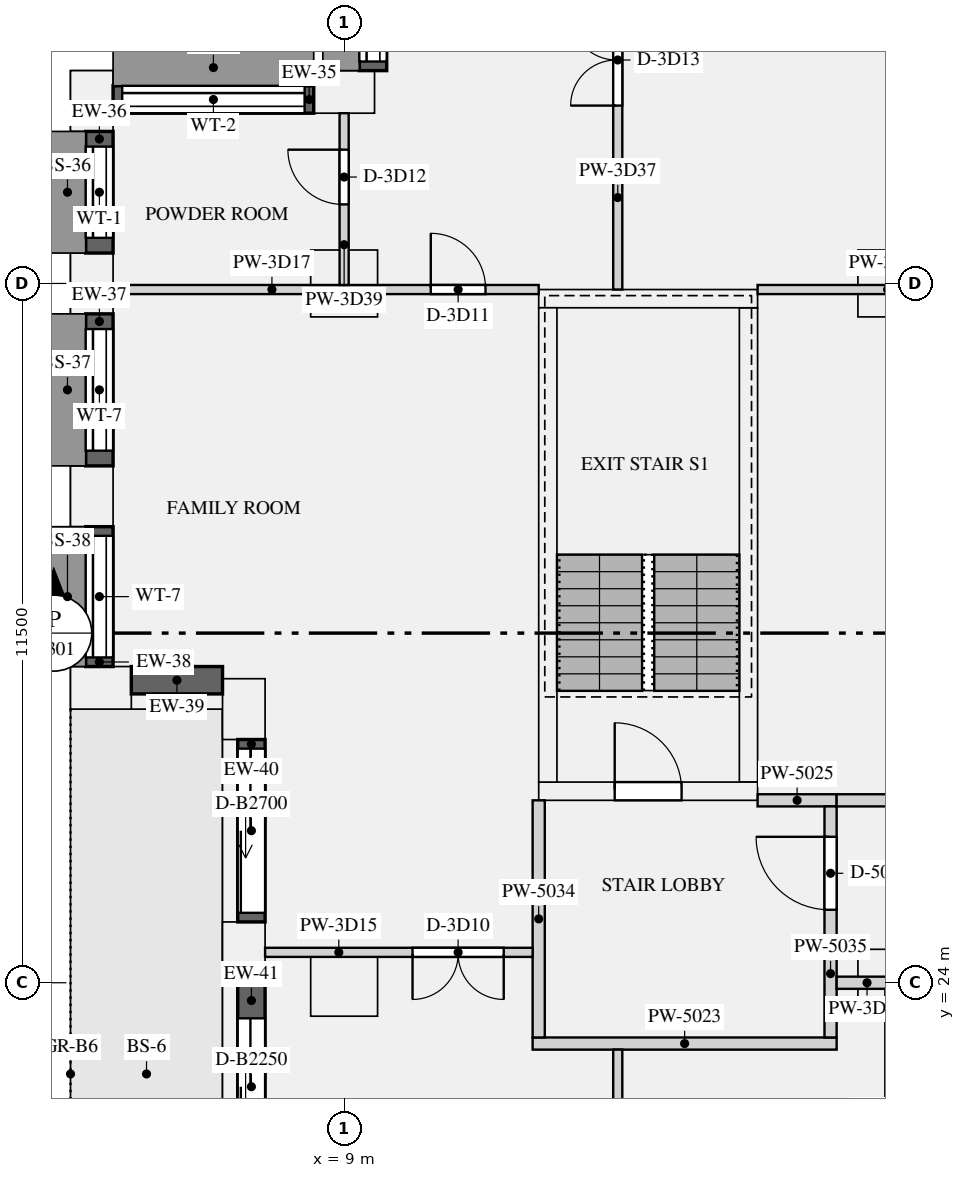
"""IFC4 building model, lengths in metres.
Left out: names, types, materials, properties, quantities, classifications, styles, units other than length and angle.
Written with IfcOpenShell. Run it as: python <this file> out.ifc"""

import sys

from ifc_helpers import new_model, si_unit, direction, frame, frame_2d, origin, origin_2d, place, context, subcontext, project, spatial, rectangle, extrude, element, fill, save


model = new_model("IFC4")
c1 = context("Model", 3, precision=1e-05, world=origin(), true_north=direction((0.0, 1.0)))
c2 = subcontext(c1, "Body", "Model", "MODEL_VIEW")
j1 = project(units=[si_unit("LENGTHUNIT", "METRE"), si_unit("PLANEANGLEUNIT", "RADIAN")], contexts=[c1])
p1 = place(None, origin())
s1 = spatial("IfcSite", under=j1, at=p1, CompositionType="ELEMENT")
p2 = place(p1, origin())
s2 = spatial("IfcBuilding", under=s1, at=p2, CompositionType="ELEMENT")
p3 = place(p2, frame((0.0, 0.0, 166.5)))
s3 = spatial("IfcBuildingStorey", under=s2, at=p3, CompositionType="ELEMENT", Elevation=166.5)
for number, where, z_axis, x_axis in (
    (1, (9.0, 38.65, 0.0), (0.0, 0.0, 1.0), (-1.0, 0.0, 0.0)),
    (2, (4.85, 38.5, 0.0), (0.0, 0.0, 1.0), (0.0, -1.0, 0.0)),
    (3, (4.85, 35.5, 0.0), (0.0, 0.0, 1.0), (0.0, -1.0, 0.0)),
    (4, (4.85, 32.0, 0.0), (0.0, 0.0, 1.0), (0.0, -1.0, 0.0)),
    (5, (5.0, 28.85, 0.0), (0.0, 0.0, 1.0), (1.0, 0.0, 0.0)),
    (6, (7.35, 28.5, 0.0), (0.0, 0.0, 1.0), (0.0, -1.0, 0.0)),
    (7, (7.35, 24.5, 0.0), (0.0, 0.0, 1.0), (0.0, -1.0, 0.0)),
):
    element("IfcColumn", number, at=place(p3, frame(where, z_axis=z_axis, x_axis=x_axis)), inside=s3, PredefinedType="USERDEFINED", context=c2, shape_type="SweptSolid", body=[
        extrude(rectangle(XDim=1.0, YDim=0.7, at=origin_2d()), origin(), (0.0, 0.0, 1.0), 3.15),
    ])
for number, where, z_axis, x_axis in (
    (8, (9.0, 24.0, 0.0), (0.0, 0.0, 1.0), (1.0, 0.0, 0.0)),
    (9, (18.0, 24.0, 0.0), (0.0, 0.0, 1.0), (1.0, 0.0, 0.0)),
    (10, (9.0, 35.5, 0.0), (0.0, 0.0, 1.0), (1.0, 0.0, 0.0)),
    (11, (18.0, 35.5, 0.0), (0.0, 0.0, 1.0), (1.0, 0.0, 0.0)),
):
    element("IfcColumn", number, at=place(p3, frame(where, z_axis=z_axis, x_axis=x_axis)), inside=s3, PredefinedType="COLUMN", context=c2, shape_type="SweptSolid", body=[
        extrude(rectangle(XDim=1.1, YDim=1.1, at=origin_2d()), origin(), (0.0, 0.0, 1.0), 3.15),
    ])
p4 = place(p3, frame((12.2, 27.15, 0.0), z_axis=(0.0, 0.0, 1.0), x_axis=(1.0, 0.0, 0.0)))
e12 = element("IfcWall", 12, at=p4, inside=s3, PredefinedType="SHEAR", context=c2, shape_type="SweptSolid", body=[
    extrude(rectangle(XDim=3.6, YDim=0.3, at=frame_2d((1.8, 0.0))), origin(), (0.0, 0.0, 1.0), 3.15),
])
p5 = place(p4, frame((1.25, 0.0, 0.0)))
e13 = element("IfcOpeningElement", 13, at=p5, cuts=e12, PredefinedType="OPENING", context=c2, shape_type="SweptSolid", body=[
    extrude(rectangle(XDim=1.1, YDim=2.1, at=frame_2d((0.55, 1.05))), frame((0.0, 0.16, 0.0), z_axis=(0.0, -1.0, 0.0), x_axis=(1.0, 0.0, 0.0)), (0.0, 0.0, 1.0), 0.32),
])
p6 = place(p3, frame((12.2, 35.25, 0.0), z_axis=(0.0, 0.0, 1.0), x_axis=(1.0, 0.0, 0.0)))
e14 = element("IfcWall", 14, at=p6, inside=s3, PredefinedType="SHEAR", context=c2, shape_type="SweptSolid", body=[
    extrude(rectangle(XDim=3.6, YDim=0.3, at=frame_2d((1.8, 0.0))), origin(), (0.0, 0.0, 1.0), 3.15),
])
for number, where, z_axis, x_axis in (
    (15, (12.35, 27.3, 0.0), (0.0, 0.0, 1.0), (0.0, 1.0, 0.0)),
    (16, (15.65, 27.3, 0.0), (0.0, 0.0, 1.0), (0.0, 1.0, 0.0)),
):
    element("IfcWall", number, at=place(p3, frame(where, z_axis=z_axis, x_axis=x_axis)), inside=s3, PredefinedType="SHEAR", context=c2, shape_type="SweptSolid", body=[
        extrude(rectangle(XDim=7.8, YDim=0.3, at=frame_2d((3.9, 0.0))), origin(), (0.0, 0.0, 1.0), 3.15),
    ])
p7 = place(p3, frame((9.475, 42.5, 0.9), z_axis=(0.0, 0.0, 1.0), x_axis=(0.0, -1.0, 0.0)))
e17 = element("IfcWall", 17, at=p7, inside=s3, PredefinedType="SOLIDWALL", context=c2, shape_type="SweptSolid", body=[
    extrude(rectangle(XDim=3.5, YDim=0.45, at=frame_2d((1.75, 0.0))), origin(), (0.0, 0.0, 1.0), 1.93),
])
p8 = place(p7, frame((0.15, 0.0, 0.15)))
e18 = element("IfcOpeningElement", 18, at=p8, cuts=e17, PredefinedType="OPENING", context=c2, shape_type="SweptSolid", body=[
    extrude(rectangle(XDim=3.2, YDim=1.5, at=frame_2d((1.6, 0.75))), frame((0.0, 0.235, 0.0), z_axis=(0.0, -1.0, 0.0), x_axis=(1.0, 0.0, 0.0)), (0.0, 0.0, 1.0), 0.47),
])
p9 = place(p3, frame((8.5, 38.525, 0.9), z_axis=(0.0, 0.0, 1.0), x_axis=(-1.0, 0.0, 0.0)))
e19 = element("IfcWall", 19, at=p9, inside=s3, PredefinedType="SOLIDWALL", context=c2, shape_type="SweptSolid", body=[
    extrude(rectangle(XDim=3.3, YDim=0.45, at=frame_2d((1.65, 0.0))), origin(), (0.0, 0.0, 1.0), 1.93),
])
p10 = place(p9, frame((0.15, 0.0, 0.15)))
e20 = element("IfcOpeningElement", 20, at=p10, cuts=e19, PredefinedType="OPENING", context=c2, shape_type="SweptSolid", body=[
    extrude(rectangle(XDim=3.0, YDim=1.5, at=frame_2d((1.5, 0.75))), frame((0.0, 0.235, 0.0), z_axis=(0.0, -1.0, 0.0), x_axis=(1.0, 0.0, 0.0)), (0.0, 0.0, 1.0), 0.47),
])
p11 = place(p3, frame((4.975, 38.0, 0.9), z_axis=(0.0, 0.0, 1.0), x_axis=(0.0, -1.0, 0.0)))
e21 = element("IfcWall", 21, at=p11, inside=s3, PredefinedType="SOLIDWALL", context=c2, shape_type="SweptSolid", body=[
    extrude(rectangle(XDim=2.0, YDim=0.45, at=frame_2d((1.0, 0.0))), origin(), (0.0, 0.0, 1.0), 1.93),
])
p12 = place(p11, frame((0.25, 0.0, 0.15)))
e22 = element("IfcOpeningElement", 22, at=p12, cuts=e21, PredefinedType="OPENING", context=c2, shape_type="SweptSolid", body=[
    extrude(rectangle(XDim=1.5, YDim=1.5, at=frame_2d((0.75, 0.75))), frame((0.0, 0.235, 0.0), z_axis=(0.0, -1.0, 0.0), x_axis=(1.0, 0.0, 0.0)), (0.0, 0.0, 1.0), 0.47),
])
p13 = place(p3, frame((4.975, 35.0, 0.9), z_axis=(0.0, 0.0, 1.0), x_axis=(0.0, -1.0, 0.0)))
e23 = element("IfcWall", 23, at=p13, inside=s3, PredefinedType="SOLIDWALL", context=c2, shape_type="SweptSolid", body=[
    extrude(rectangle(XDim=2.5, YDim=0.45, at=frame_2d((1.25, 0.0))), origin(), (0.0, 0.0, 1.0), 1.93),
])
p14 = place(p13, frame((0.25, 0.0, 0.15)))
e24 = element("IfcOpeningElement", 24, at=p14, cuts=e23, PredefinedType="OPENING", context=c2, shape_type="SweptSolid", body=[
    extrude(rectangle(XDim=2.0, YDim=1.5, at=frame_2d((1.0, 0.75))), frame((0.0, 0.235, 0.0), z_axis=(0.0, -1.0, 0.0), x_axis=(1.0, 0.0, 0.0)), (0.0, 0.0, 1.0), 0.47),
])
p15 = place(p3, frame((4.975, 31.5, 0.9), z_axis=(0.0, 0.0, 1.0), x_axis=(0.0, -1.0, 0.0)))
e25 = element("IfcWall", 25, at=p15, inside=s3, PredefinedType="SOLIDWALL", context=c2, shape_type="SweptSolid", body=[
    extrude(rectangle(XDim=2.3, YDim=0.45, at=frame_2d((1.15, 0.0))), origin(), (0.0, 0.0, 1.0), 1.93),
])
p16 = place(p15, frame((0.15, 0.0, 0.15)))
e26 = element("IfcOpeningElement", 26, at=p16, cuts=e25, PredefinedType="OPENING", context=c2, shape_type="SweptSolid", body=[
    extrude(rectangle(XDim=2.0, YDim=1.5, at=frame_2d((1.0, 0.75))), frame((0.0, 0.235, 0.0), z_axis=(0.0, -1.0, 0.0), x_axis=(1.0, 0.0, 0.0)), (0.0, 0.0, 1.0), 0.47),
])
p17 = place(p3, frame((5.5, 28.975, 0.9), z_axis=(0.0, 0.0, 1.0), x_axis=(1.0, 0.0, 0.0)))
e27 = element("IfcWall", 27, at=p17, inside=s3, PredefinedType="SOLIDWALL", context=c2, shape_type="SweptSolid", body=[
    extrude(rectangle(XDim=1.5, YDim=0.45, at=frame_2d((0.75, 0.0))), origin(), (0.0, 0.0, 1.0), 1.93),
])
p18 = place(p3, frame((7.475, 28.0, 0.0), z_axis=(0.0, 0.0, 1.0), x_axis=(0.0, -1.0, 0.0)))
e28 = element("IfcWall", 28, at=p18, inside=s3, PredefinedType="SOLIDWALL", context=c2, shape_type="SweptSolid", body=[
    extrude(rectangle(XDim=3.0, YDim=0.45, at=frame_2d((1.5, 0.0))), origin(), (0.0, 0.0, 1.0), 2.83),
])
p19 = place(p18, frame((0.15, 0.0, 0.0)))
e29 = element("IfcOpeningElement", 29, at=p19, cuts=e28, PredefinedType="OPENING", context=c2, shape_type="SweptSolid", body=[
    extrude(rectangle(XDim=2.7, YDim=2.3, at=frame_2d((1.35, 1.15))), frame((0.0, 0.235, 0.0), z_axis=(0.0, -1.0, 0.0), x_axis=(1.0, 0.0, 0.0)), (0.0, 0.0, 1.0), 0.47),
])
p20 = place(p3, frame((7.475, 24.0, 0.0), z_axis=(0.0, 0.0, 1.0), x_axis=(0.0, -1.0, 0.0)))
e30 = element("IfcWall", 30, at=p20, inside=s3, PredefinedType="SOLIDWALL", context=c2, shape_type="SweptSolid", body=[
    extrude(rectangle(XDim=3.0, YDim=0.45, at=frame_2d((1.5, 0.0))), origin(), (0.0, 0.0, 1.0), 2.83),
])
p21 = place(p20, frame((0.585, 0.0, 0.0)))
e31 = element("IfcOpeningElement", 31, at=p21, cuts=e30, PredefinedType="OPENING", context=c2, shape_type="SweptSolid", body=[
    extrude(rectangle(XDim=2.25, YDim=2.3, at=frame_2d((1.125, 1.15))), frame((0.0, 0.235, 0.0), z_axis=(0.0, -1.0, 0.0), x_axis=(1.0, 0.0, 0.0)), (0.0, 0.0, 1.0), 0.47),
])
p22 = place(p3, frame((12.1, 23.0, 0.0), z_axis=(0.0, 0.0, 1.0), x_axis=(1.0, 0.0, 0.0)))
e32 = element("IfcWall", 32, at=p22, inside=s3, PredefinedType="PARTITIONING", context=c2, shape_type="SweptSolid", body=[
    extrude(rectangle(XDim=5.0, YDim=0.2, at=frame_2d((2.5, 0.0))), origin(), (0.0, 0.0, 1.0), 2.83),
])
p23 = place(p3, frame((15.8, 27.0, 0.0), z_axis=(0.0, 0.0, 1.0), x_axis=(1.0, 0.0, 0.0)))
e33 = element("IfcWall", 33, at=p23, inside=s3, PredefinedType="PARTITIONING", context=c2, shape_type="SweptSolid", body=[
    extrude(rectangle(XDim=1.3, YDim=0.2, at=frame_2d((0.65, 0.0))), origin(), (0.0, 0.0, 1.0), 2.83),
])
p24 = place(p3, frame((12.2, 23.1, 0.0), z_axis=(0.0, 0.0, 1.0), x_axis=(0.0, 1.0, 0.0)))
e34 = element("IfcWall", 34, at=p24, inside=s3, PredefinedType="PARTITIONING", context=c2, shape_type="SweptSolid", body=[
    extrude(rectangle(XDim=3.9, YDim=0.2, at=frame_2d((1.95, 0.0))), origin(), (0.0, 0.0, 1.0), 2.83),
])
p25 = place(p3, frame((17.0, 23.1, 0.0), z_axis=(0.0, 0.0, 1.0), x_axis=(0.0, 1.0, 0.0)))
e35 = element("IfcWall", 35, at=p25, inside=s3, PredefinedType="PARTITIONING", context=c2, shape_type="SweptSolid", body=[
    extrude(rectangle(XDim=3.8, YDim=0.2, at=frame_2d((1.9, 0.0))), origin(), (0.0, 0.0, 1.0), 2.83),
])
p26 = place(p25, frame((2.1, 0.0, 0.0)))
e36 = element("IfcOpeningElement", 36, at=p26, cuts=e35, PredefinedType="OPENING", context=c2, shape_type="SweptSolid", body=[
    extrude(rectangle(XDim=1.2, YDim=2.1, at=frame_2d((0.6, 1.05))), frame((0.0, 0.11, 0.0), z_axis=(0.0, -1.0, 0.0), x_axis=(1.0, 0.0, 0.0)), (0.0, 0.0, 1.0), 0.22),
])
p27 = place(p3, frame((17.1, 24.0, 0.0), z_axis=(0.0, 0.0, 1.0), x_axis=(1.0, 0.0, 0.0)))
e37 = element("IfcWall", 37, at=p27, inside=s3, PredefinedType="PARTITIONING", context=c2, shape_type="SweptSolid", body=[
    extrude(rectangle(XDim=1.0, YDim=0.2, at=frame_2d((0.5, 0.0))), origin(), (0.0, 0.0, 1.0), 2.83),
])
p28 = place(p3, frame((17.1, 27.0, 0.0), z_axis=(0.0, 0.0, 1.0), x_axis=(1.0, 0.0, 0.0)))
e38 = element("IfcWall", 38, at=p28, inside=s3, PredefinedType="PARTITIONING", context=c2, shape_type="SweptSolid", body=[
    extrude(rectangle(XDim=7.0, YDim=0.2, at=frame_2d((3.5, 0.0))), origin(), (0.0, 0.0, 1.0), 2.83),
])
p29 = place(p3, frame((7.7, 24.5, 0.0), z_axis=(0.0, 0.0, 1.0), x_axis=(1.0, 0.0, 0.0)))
e39 = element("IfcWall", 39, at=p29, inside=s3, PredefinedType="PARTITIONING", context=c2, shape_type="SweptSolid", body=[
    extrude(rectangle(XDim=4.4, YDim=0.15, at=frame_2d((2.2, 0.0))), origin(), (0.0, 0.0, 1.0), 2.83),
])
p30 = place(p29, frame((2.425, 0.0, 0.0)))
e40 = element("IfcOpeningElement", 40, at=p30, cuts=e39, PredefinedType="OPENING", context=c2, shape_type="SweptSolid", body=[
    extrude(rectangle(XDim=1.5, YDim=2.1, at=frame_2d((0.75, 1.05))), frame((0.0, 0.085, 0.0), z_axis=(0.0, -1.0, 0.0), x_axis=(1.0, 0.0, 0.0)), (0.0, 0.0, 1.0), 0.17),
])
p31 = place(p3, frame((5.2, 35.4, 0.0), z_axis=(0.0, 0.0, 1.0), x_axis=(1.0, 0.0, 0.0)))
e41 = element("IfcWall", 41, at=p31, inside=s3, PredefinedType="PARTITIONING", context=c2, shape_type="SweptSolid", body=[
    extrude(rectangle(XDim=7.0, YDim=0.15, at=frame_2d((3.5, 0.0))), origin(), (0.0, 0.0, 1.0), 2.83),
])
p32 = place(p31, frame((5.225, 0.0, 0.0)))
e42 = element("IfcOpeningElement", 42, at=p32, cuts=e41, PredefinedType="OPENING", context=c2, shape_type="SweptSolid", body=[
    extrude(rectangle(XDim=0.9, YDim=2.1, at=frame_2d((0.45, 1.05))), frame((0.0, 0.085, 0.0), z_axis=(0.0, -1.0, 0.0), x_axis=(1.0, 0.0, 0.0)), (0.0, 0.0, 1.0), 0.17),
])
p33 = place(p3, frame((15.8, 35.4, 0.0), z_axis=(0.0, 0.0, 1.0), x_axis=(1.0, 0.0, 0.0)))
e43 = element("IfcWall", 43, at=p33, inside=s3, PredefinedType="PARTITIONING", context=c2, shape_type="SweptSolid", body=[
    extrude(rectangle(XDim=6.775, YDim=0.15, at=frame_2d((3.387, 0.0))), origin(), (0.0, 0.0, 1.0), 2.83),
])
p34 = place(p33, frame((4.275, 0.0, 0.0)))
e44 = element("IfcOpeningElement", 44, at=p34, cuts=e43, PredefinedType="OPENING", context=c2, shape_type="SweptSolid", body=[
    extrude(rectangle(XDim=0.9, YDim=2.1, at=frame_2d((0.45, 1.05))), frame((0.0, 0.085, 0.0), z_axis=(0.0, -1.0, 0.0), x_axis=(1.0, 0.0, 0.0)), (0.0, 0.0, 1.0), 0.17),
])
p35 = place(p3, frame((13.5, 10.575, 0.0), z_axis=(0.0, 0.0, 1.0), x_axis=(0.0, 1.0, 0.0)))
e45 = element("IfcWall", 45, at=p35, inside=s3, PredefinedType="PARTITIONING", context=c2, shape_type="SweptSolid", body=[
    extrude(rectangle(XDim=12.325, YDim=0.15, at=frame_2d((6.163, 0.0))), origin(), (0.0, 0.0, 1.0), 2.83),
])
p36 = place(p35, frame((3.475, 0.0, 0.0)))
e46 = element("IfcOpeningElement", 46, at=p36, cuts=e45, PredefinedType="OPENING", context=c2, shape_type="SweptSolid", body=[
    extrude(rectangle(XDim=0.9, YDim=2.1, at=frame_2d((0.45, 1.05))), frame((0.0, 0.085, 0.0), z_axis=(0.0, -1.0, 0.0), x_axis=(1.0, 0.0, 0.0)), (0.0, 0.0, 1.0), 0.17),
])
p37 = place(p35, frame((8.45, 0.0, 0.0)))
e47 = element("IfcOpeningElement", 47, at=p37, cuts=e45, PredefinedType="OPENING", context=c2, shape_type="SweptSolid", body=[
    extrude(rectangle(XDim=1.5, YDim=2.1, at=frame_2d((0.75, 1.05))), frame((0.0, 0.085, 0.0), z_axis=(0.0, -1.0, 0.0), x_axis=(1.0, 0.0, 0.0)), (0.0, 0.0, 1.0), 0.17),
])
p38 = place(p3, frame((13.5, 35.4, 0.0), z_axis=(0.0, 0.0, 1.0), x_axis=(0.0, 1.0, 0.0)))
e48 = element("IfcWall", 48, at=p38, inside=s3, PredefinedType="PARTITIONING", context=c2, shape_type="SweptSolid", body=[
    extrude(rectangle(XDim=7.4, YDim=0.15, at=frame_2d((3.7, 0.0))), origin(), (0.0, 0.0, 1.0), 2.83),
])
p39 = place(p38, frame((3.025, 0.0, 0.0)))
e49 = element("IfcOpeningElement", 49, at=p39, cuts=e48, PredefinedType="OPENING", context=c2, shape_type="SweptSolid", body=[
    extrude(rectangle(XDim=1.5, YDim=2.1, at=frame_2d((0.75, 1.05))), frame((0.0, 0.085, 0.0), z_axis=(0.0, -1.0, 0.0), x_axis=(1.0, 0.0, 0.0)), (0.0, 0.0, 1.0), 0.17),
])
p40 = place(p3, frame((9.0, 35.475, 0.0), z_axis=(0.0, 0.0, 1.0), x_axis=(0.0, 1.0, 0.0)))
e50 = element("IfcWall", 50, at=p40, inside=s3, PredefinedType="PARTITIONING", context=c2, shape_type="SweptSolid", body=[
    extrude(rectangle(XDim=2.825, YDim=0.15, at=frame_2d((1.413, 0.0))), origin(), (0.0, 0.0, 1.0), 2.83),
])
p41 = place(p40, frame((1.325, 0.0, 0.0)))
e51 = element("IfcOpeningElement", 51, at=p41, cuts=e50, PredefinedType="OPENING", context=c2, shape_type="SweptSolid", body=[
    extrude(rectangle(XDim=0.9, YDim=2.1, at=frame_2d((0.45, 1.05))), frame((0.0, 0.085, 0.0), z_axis=(0.0, -1.0, 0.0), x_axis=(1.0, 0.0, 0.0)), (0.0, 0.0, 1.0), 0.17),
])
p42 = place(p8, origin())
e52 = element("IfcWindow", 52, at=p42, inside=s3, PartitioningType="SINGLE_PANEL", PredefinedType="WINDOW", context=c2, shape_type="SweptSolid", body=[
    extrude(rectangle(XDim=3.2, YDim=1.5, at=frame_2d((1.6, 0.75))), frame((0.0, -0.065, 0.0), z_axis=(0.0, -1.0, 0.0), x_axis=(1.0, 0.0, 0.0)), (0.0, 0.0, 1.0), 0.06),
])
fill(e18, e52)
p43 = place(p10, origin())
e53 = element("IfcWindow", 53, at=p43, inside=s3, PartitioningType="SINGLE_PANEL", PredefinedType="WINDOW", context=c2, shape_type="SweptSolid", body=[
    extrude(rectangle(XDim=3.0, YDim=1.5, at=frame_2d((1.5, 0.75))), frame((0.0, -0.065, 0.0), z_axis=(0.0, -1.0, 0.0), x_axis=(1.0, 0.0, 0.0)), (0.0, 0.0, 1.0), 0.06),
])
fill(e20, e53)
p44 = place(p12, origin())
e54 = element("IfcWindow", 54, at=p44, inside=s3, PartitioningType="SINGLE_PANEL", PredefinedType="WINDOW", context=c2, shape_type="SweptSolid", body=[
    extrude(rectangle(XDim=1.5, YDim=1.5, at=frame_2d((0.75, 0.75))), frame((0.0, -0.065, 0.0), z_axis=(0.0, -1.0, 0.0), x_axis=(1.0, 0.0, 0.0)), (0.0, 0.0, 1.0), 0.06),
])
fill(e22, e54)
p45 = place(p14, origin())
e55 = element("IfcWindow", 55, at=p45, inside=s3, PartitioningType="SINGLE_PANEL", PredefinedType="WINDOW", context=c2, shape_type="SweptSolid", body=[
    extrude(rectangle(XDim=2.0, YDim=1.5, at=frame_2d((1.0, 0.75))), frame((0.0, -0.065, 0.0), z_axis=(0.0, -1.0, 0.0), x_axis=(1.0, 0.0, 0.0)), (0.0, 0.0, 1.0), 0.06),
])
fill(e24, e55)
p46 = place(p16, origin())
e56 = element("IfcWindow", 56, at=p46, inside=s3, PartitioningType="SINGLE_PANEL", PredefinedType="WINDOW", context=c2, shape_type="SweptSolid", body=[
    extrude(rectangle(XDim=2.0, YDim=1.5, at=frame_2d((1.0, 0.75))), frame((0.0, -0.065, 0.0), z_axis=(0.0, -1.0, 0.0), x_axis=(1.0, 0.0, 0.0)), (0.0, 0.0, 1.0), 0.06),
])
fill(e26, e56)
p47 = place(p19, origin())
e57 = element("IfcDoor", 57, at=p47, inside=s3, OperationType="SLIDING_TO_LEFT", PredefinedType="DOOR", context=c2, shape_type="SweptSolid", body=[
    extrude(rectangle(XDim=2.7, YDim=2.3, at=frame_2d((1.35, 1.15))), frame((0.0, -0.07, 0.0), z_axis=(0.0, -1.0, 0.0), x_axis=(1.0, 0.0, 0.0)), (0.0, 0.0, 1.0), 0.05),
])
fill(e29, e57)
p48 = place(p21, origin())
e58 = element("IfcDoor", 58, at=p48, inside=s3, OperationType="SLIDING_TO_LEFT", PredefinedType="DOOR", context=c2, shape_type="SweptSolid", body=[
    extrude(rectangle(XDim=2.25, YDim=2.3, at=frame_2d((1.125, 1.15))), frame((0.0, -0.07, 0.0), z_axis=(0.0, -1.0, 0.0), x_axis=(1.0, 0.0, 0.0)), (0.0, 0.0, 1.0), 0.05),
])
fill(e31, e58)
p49 = place(p5, origin())
e59 = element("IfcDoor", 59, at=p49, inside=s3, OperationType="SINGLE_SWING_LEFT", PredefinedType="DOOR", context=c2, shape_type="SweptSolid", body=[
    extrude(rectangle(XDim=1.1, YDim=2.1, at=frame_2d((0.55, 1.05))), frame((0.0, 0.025, 0.0), z_axis=(0.0, -1.0, 0.0), x_axis=(1.0, 0.0, 0.0)), (0.0, 0.0, 1.0), 0.05),
])
fill(e13, e59)
p50 = place(p26, origin())
e60 = element("IfcDoor", 60, at=p50, inside=s3, OperationType="SINGLE_SWING_RIGHT", PredefinedType="DOOR", context=c2, shape_type="SweptSolid", body=[
    extrude(rectangle(XDim=1.2, YDim=2.1, at=frame_2d((0.6, 1.05))), frame((0.0, 0.025, 0.0), z_axis=(0.0, -1.0, 0.0), x_axis=(1.0, 0.0, 0.0)), (0.0, 0.0, 1.0), 0.05),
])
fill(e36, e60)
p51 = place(p30, frame((1.5, 0.0, 0.0), z_axis=(0.0, 0.0, 1.0), x_axis=(-1.0, 0.0, 0.0)))
e61 = element("IfcDoor", 61, at=p51, inside=s3, OperationType="DOUBLE_DOOR_SINGLE_SWING", PredefinedType="DOOR", context=c2, shape_type="SweptSolid", body=[
    extrude(rectangle(XDim=1.5, YDim=2.1, at=frame_2d((0.75, 1.05))), frame((0.0, 0.025, 0.0), z_axis=(0.0, -1.0, 0.0), x_axis=(1.0, 0.0, 0.0)), (0.0, 0.0, 1.0), 0.05),
])
fill(e40, e61)
p52 = place(p32, origin())
e62 = element("IfcDoor", 62, at=p52, inside=s3, OperationType="SINGLE_SWING_LEFT", PredefinedType="DOOR", context=c2, shape_type="SweptSolid", body=[
    extrude(rectangle(XDim=0.9, YDim=2.1, at=frame_2d((0.45, 1.05))), frame((0.0, 0.025, 0.0), z_axis=(0.0, -1.0, 0.0), x_axis=(1.0, 0.0, 0.0)), (0.0, 0.0, 1.0), 0.05),
])
fill(e42, e62)
p53 = place(p41, origin())
e63 = element("IfcDoor", 63, at=p53, inside=s3, OperationType="SINGLE_SWING_RIGHT", PredefinedType="DOOR", context=c2, shape_type="SweptSolid", body=[
    extrude(rectangle(XDim=0.9, YDim=2.1, at=frame_2d((0.45, 1.05))), frame((0.0, 0.025, 0.0), z_axis=(0.0, -1.0, 0.0), x_axis=(1.0, 0.0, 0.0)), (0.0, 0.0, 1.0), 0.05),
])
fill(e51, e63)
p54 = place(p39, origin())
e64 = element("IfcDoor", 64, at=p54, inside=s3, OperationType="DOUBLE_DOOR_SINGLE_SWING", PredefinedType="DOOR", context=c2, shape_type="SweptSolid", body=[
    extrude(rectangle(XDim=1.5, YDim=2.1, at=frame_2d((0.75, 1.05))), frame((0.0, 0.025, 0.0), z_axis=(0.0, -1.0, 0.0), x_axis=(1.0, 0.0, 0.0)), (0.0, 0.0, 1.0), 0.05),
])
fill(e49, e64)
save(model, sys.argv[1])
